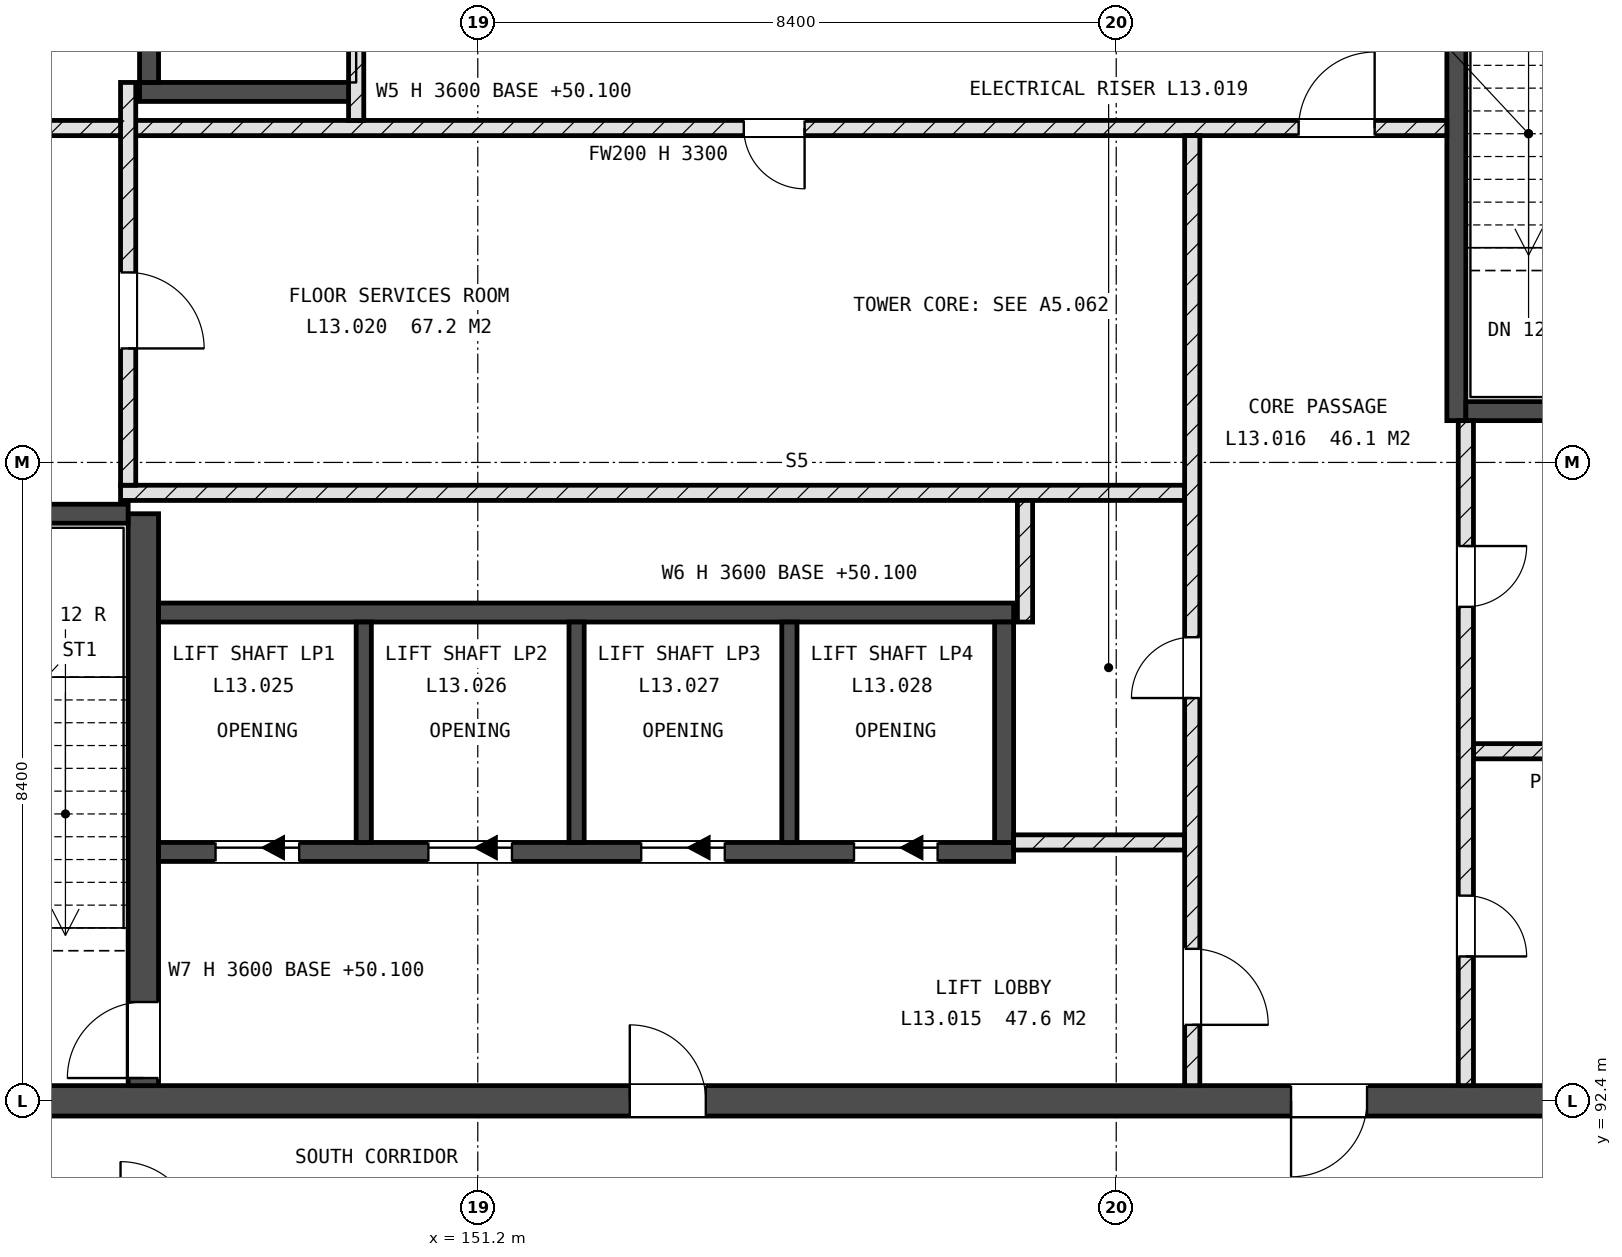
"""IFC4 building model, lengths in metres.
Left out: names, types, materials, properties, quantities, classifications, styles, units other than length and angle.
Written with IfcOpenShell. Run it as: python <this file> out.ifc"""

import sys

from ifc_helpers import new_model, si_unit, direction, frame, frame_2d, origin, place, context, subcontext, project, spatial, rectangle, extrude, element, fill, save


model = new_model("IFC4")
c1 = context("Model", 3, precision=1e-05, world=origin(), true_north=direction((0.0, 1.0)))
c2 = subcontext(c1, "Body", "Model", "MODEL_VIEW")
j1 = project(units=[si_unit("LENGTHUNIT", "METRE"), si_unit("PLANEANGLEUNIT", "RADIAN")], contexts=[c1])
p1 = place(None, origin())
s1 = spatial("IfcSite", under=j1, at=p1, CompositionType="ELEMENT")
p2 = place(p1, origin())
s2 = spatial("IfcBuilding", under=s1, at=p2, CompositionType="ELEMENT")
p3 = place(p2, frame((0.0, 0.0, 50.4)))
s3 = spatial("IfcBuildingStorey", under=s2, at=p3, CompositionType="ELEMENT", Elevation=50.4)
p4 = place(p3, frame((142.8, 92.4, -0.3), z_axis=(0.0, 0.0, 1.0), x_axis=(1.0, 0.0, 0.0)))
e1 = element("IfcWall", 1, at=p4, inside=s3, PredefinedType="SHEAR", context=c2, shape_type="SweptSolid", body=[
    extrude(rectangle(XDim=25.2, YDim=0.4, at=frame_2d((12.6, 0.0))), origin(), (0.0, 0.0, 1.0), 3.6),
])
p5 = place(p4, frame((1.4, 0.0, 0.3)))
e2 = element("IfcOpeningElement", 2, at=p5, cuts=e1, PredefinedType="OPENING", context=c2, shape_type="SweptSolid", body=[
    extrude(rectangle(XDim=1.0, YDim=2.1, at=frame_2d((0.5, 1.05))), frame((0.0, 0.21, 0.0), z_axis=(0.0, -1.0, 0.0), x_axis=(1.0, 0.0, 0.0)), (0.0, 0.0, 1.0), 0.42),
])
p6 = place(p4, frame((19.1, 0.0, 0.3)))
e3 = element("IfcOpeningElement", 3, at=p6, cuts=e1, PredefinedType="OPENING", context=c2, shape_type="SweptSolid", body=[
    extrude(rectangle(XDim=1.0, YDim=2.1, at=frame_2d((0.5, 1.05))), frame((0.0, 0.21, 0.0), z_axis=(0.0, -1.0, 0.0), x_axis=(1.0, 0.0, 0.0)), (0.0, 0.0, 1.0), 0.42),
])
p7 = place(p4, frame((10.4, 0.0, 0.3)))
e4 = element("IfcOpeningElement", 4, at=p7, cuts=e1, PredefinedType="OPENING", context=c2, shape_type="SweptSolid", body=[
    extrude(rectangle(XDim=1.0, YDim=2.1, at=frame_2d((0.5, 1.05))), frame((0.0, 0.21, 0.0), z_axis=(0.0, -1.0, 0.0), x_axis=(1.0, 0.0, 0.0)), (0.0, 0.0, 1.0), 0.42),
])
p8 = place(p3, frame((146.8, 92.6, -0.3), z_axis=(0.0, 0.0, 1.0), x_axis=(0.0, 1.0, 0.0)))
e5 = element("IfcWall", 5, at=p8, inside=s3, PredefinedType="SHEAR", context=c2, shape_type="SweptSolid", body=[
    extrude(rectangle(XDim=7.525, YDim=0.4, at=frame_2d((3.762, 0.0))), origin(), (0.0, 0.0, 1.0), 3.6),
])
p9 = place(p8, frame((0.1, 0.0, 0.3)))
e6 = element("IfcOpeningElement", 6, at=p9, cuts=e5, PredefinedType="OPENING", context=c2, shape_type="SweptSolid", body=[
    extrude(rectangle(XDim=1.0, YDim=2.1, at=frame_2d((0.5, 1.05))), frame((0.0, 0.21, 0.0), z_axis=(0.0, -1.0, 0.0), x_axis=(1.0, 0.0, 0.0)), (0.0, 0.0, 1.0), 0.42),
])
p10 = place(p3, frame((143.2, 100.125, -0.3), z_axis=(0.0, 0.0, 1.0), x_axis=(1.0, 0.0, 0.0)))
e7 = element("IfcWall", 7, at=p10, inside=s3, PredefinedType="SHEAR", context=c2, shape_type="SweptSolid", body=[
    extrude(rectangle(XDim=3.4, YDim=0.25, at=frame_2d((1.7, 0.0))), origin(), (0.0, 0.0, 1.0), 3.6),
])
p11 = place(p3, frame((164.075, 101.35, -0.3), z_axis=(0.0, 0.0, 1.0), x_axis=(0.0, 1.0, 0.0)))
e8 = element("IfcWall", 8, at=p11, inside=s3, PredefinedType="SHEAR", context=c2, shape_type="SweptSolid", body=[
    extrude(rectangle(XDim=7.65, YDim=0.25, at=frame_2d((3.825, 0.0))), origin(), (0.0, 0.0, 1.0), 3.6),
])
p12 = place(p11, frame((6.55, 0.0, 0.3)))
e9 = element("IfcOpeningElement", 9, at=p12, cuts=e8, PredefinedType="OPENING", context=c2, shape_type="SweptSolid", body=[
    extrude(rectangle(XDim=1.0, YDim=2.1, at=frame_2d((0.5, 1.05))), frame((0.0, 0.135, 0.0), z_axis=(0.0, -1.0, 0.0), x_axis=(1.0, 0.0, 0.0)), (0.0, 0.0, 1.0), 0.27),
])
p13 = place(p3, frame((164.2, 101.475, -0.3), z_axis=(0.0, 0.0, 1.0), x_axis=(1.0, 0.0, 0.0)))
e10 = element("IfcWall", 10, at=p13, inside=s3, PredefinedType="SHEAR", context=c2, shape_type="SweptSolid", body=[
    extrude(rectangle(XDim=3.6, YDim=0.25, at=frame_2d((1.8, 0.0))), origin(), (0.0, 0.0, 1.0), 3.6),
])
p14 = place(p3, frame((147.0, 95.675, -0.3), z_axis=(0.0, 0.0, 1.0), x_axis=(1.0, 0.0, 0.0)))
e11 = element("IfcWall", 11, at=p14, inside=s3, PredefinedType="SHEAR", context=c2, shape_type="SweptSolid", body=[
    extrude(rectangle(XDim=11.25, YDim=0.25, at=frame_2d((5.625, 0.0))), origin(), (0.0, 0.0, 1.0), 3.6),
])
p15 = place(p14, frame((0.75, 0.0, 0.3)))
e12 = element("IfcOpeningElement", 12, at=p15, cuts=e11, PredefinedType="OPENING", context=c2, shape_type="SweptSolid", body=[
    extrude(rectangle(XDim=1.1, YDim=2.1, at=frame_2d((0.55, 1.05))), frame((0.0, 0.135, 0.0), z_axis=(0.0, -1.0, 0.0), x_axis=(1.0, 0.0, 0.0)), (0.0, 0.0, 1.0), 0.27),
])
p16 = place(p14, frame((3.55, 0.0, 0.3)))
e13 = element("IfcOpeningElement", 13, at=p16, cuts=e11, PredefinedType="OPENING", context=c2, shape_type="SweptSolid", body=[
    extrude(rectangle(XDim=1.1, YDim=2.1, at=frame_2d((0.55, 1.05))), frame((0.0, 0.135, 0.0), z_axis=(0.0, -1.0, 0.0), x_axis=(1.0, 0.0, 0.0)), (0.0, 0.0, 1.0), 0.27),
])
p17 = place(p14, frame((6.35, 0.0, 0.3)))
e14 = element("IfcOpeningElement", 14, at=p17, cuts=e11, PredefinedType="OPENING", context=c2, shape_type="SweptSolid", body=[
    extrude(rectangle(XDim=1.1, YDim=2.1, at=frame_2d((0.55, 1.05))), frame((0.0, 0.135, 0.0), z_axis=(0.0, -1.0, 0.0), x_axis=(1.0, 0.0, 0.0)), (0.0, 0.0, 1.0), 0.27),
])
p18 = place(p14, frame((9.15, 0.0, 0.3)))
e15 = element("IfcOpeningElement", 15, at=p18, cuts=e11, PredefinedType="OPENING", context=c2, shape_type="SweptSolid", body=[
    extrude(rectangle(XDim=1.1, YDim=2.1, at=frame_2d((0.55, 1.05))), frame((0.0, 0.135, 0.0), z_axis=(0.0, -1.0, 0.0), x_axis=(1.0, 0.0, 0.0)), (0.0, 0.0, 1.0), 0.27),
])
p19 = place(p3, frame((147.0, 98.825, -0.3), z_axis=(0.0, 0.0, 1.0), x_axis=(1.0, 0.0, 0.0)))
e16 = element("IfcWall", 16, at=p19, inside=s3, PredefinedType="SHEAR", context=c2, shape_type="SweptSolid", body=[
    extrude(rectangle(XDim=11.25, YDim=0.25, at=frame_2d((5.625, 0.0))), origin(), (0.0, 0.0, 1.0), 3.6),
])
p20 = place(p3, frame((158.125, 95.8, -0.3), z_axis=(0.0, 0.0, 1.0), x_axis=(0.0, 1.0, 0.0)))
e17 = element("IfcWall", 17, at=p20, inside=s3, PredefinedType="SHEAR", context=c2, shape_type="SweptSolid", body=[
    extrude(rectangle(XDim=2.9, YDim=0.25, at=frame_2d((1.45, 0.0))), origin(), (0.0, 0.0, 1.0), 3.6),
])
for number, where, z_axis, x_axis in (
    (18, (149.7, 95.8, -0.3), (0.0, 0.0, 1.0), (0.0, 1.0, 0.0)),
    (19, (152.5, 95.8, -0.3), (0.0, 0.0, 1.0), (0.0, 1.0, 0.0)),
    (20, (155.3, 95.8, -0.3), (0.0, 0.0, 1.0), (0.0, 1.0, 0.0)),
):
    element("IfcWall", number, at=place(p3, frame(where, z_axis=z_axis, x_axis=x_axis)), inside=s3, PredefinedType="SHEAR", context=c2, shape_type="SweptSolid", body=[
        extrude(rectangle(XDim=2.9, YDim=0.2, at=frame_2d((1.45, 0.0))), origin(), (0.0, 0.0, 1.0), 3.6),
    ])
p21 = place(p3, frame((146.75, 105.675, -0.3), z_axis=(0.0, 0.0, 1.0), x_axis=(1.0, 0.0, 0.0)))
e21 = element("IfcWall", 21, at=p21, inside=s3, PredefinedType="SHEAR", context=c2, shape_type="SweptSolid", body=[
    extrude(rectangle(XDim=2.85, YDim=0.25, at=frame_2d((1.425, 0.0))), origin(), (0.0, 0.0, 1.0), 3.6),
])
p22 = place(p3, frame((146.875, 105.8, -0.3), z_axis=(0.0, 0.0, 1.0), x_axis=(0.0, 1.0, 0.0)))
e22 = element("IfcWall", 22, at=p22, inside=s3, PredefinedType="SHEAR", context=c2, shape_type="SweptSolid", body=[
    extrude(rectangle(XDim=2.9, YDim=0.25, at=frame_2d((1.45, 0.0))), origin(), (0.0, 0.0, 1.0), 3.6),
])
p23 = place(p3, frame((158.25, 95.8, 0.0), z_axis=(0.0, 0.0, 1.0), x_axis=(1.0, 0.0, 0.0)))
e23 = element("IfcWall", 23, at=p23, inside=s3, PredefinedType="SOLIDWALL", context=c2, shape_type="SweptSolid", body=[
    extrude(rectangle(XDim=2.25, YDim=0.2, at=frame_2d((1.125, 0.0))), origin(), (0.0, 0.0, 1.0), 3.3),
])
p24 = place(p3, frame((164.3, 97.0, 0.0), z_axis=(0.0, 0.0, 1.0), x_axis=(1.0, 0.0, 0.0)))
e24 = element("IfcWall", 24, at=p24, inside=s3, PredefinedType="SOLIDWALL", context=c2, shape_type="SweptSolid", body=[
    extrude(rectangle(XDim=3.3, YDim=0.2, at=frame_2d((1.65, 0.0))), origin(), (0.0, 0.0, 1.0), 3.3),
])
p25 = place(p3, frame((146.5, 100.4, 0.0), z_axis=(0.0, 0.0, 1.0), x_axis=(1.0, 0.0, 0.0)))
e25 = element("IfcWall", 25, at=p25, inside=s3, PredefinedType="SOLIDWALL", context=c2, shape_type="SweptSolid", body=[
    extrude(rectangle(XDim=14.0, YDim=0.2, at=frame_2d((7.0, 0.0))), origin(), (0.0, 0.0, 1.0), 3.3),
])
p26 = place(p3, frame((143.2, 105.2, 0.0), z_axis=(0.0, 0.0, 1.0), x_axis=(1.0, 0.0, 0.0)))
e26 = element("IfcWall", 26, at=p26, inside=s3, PredefinedType="SOLIDWALL", context=c2, shape_type="SweptSolid", body=[
    extrude(rectangle(XDim=20.75, YDim=0.2, at=frame_2d((10.375, 0.0))), origin(), (0.0, 0.0, 1.0), 3.3),
])
p27 = place(p26, frame((11.5, 0.0, 0.0)))
e27 = element("IfcOpeningElement", 27, at=p27, cuts=e26, PredefinedType="OPENING", context=c2, shape_type="SweptSolid", body=[
    extrude(rectangle(XDim=0.8, YDim=2.1, at=frame_2d((0.4, 1.05))), frame((0.0, 0.11, 0.0), z_axis=(0.0, -1.0, 0.0), x_axis=(1.0, 0.0, 0.0)), (0.0, 0.0, 1.0), 0.22),
])
p28 = place(p26, frame((18.8, 0.0, 0.0)))
e28 = element("IfcOpeningElement", 28, at=p28, cuts=e26, PredefinedType="OPENING", context=c2, shape_type="SweptSolid", body=[
    extrude(rectangle(XDim=1.0, YDim=2.1, at=frame_2d((0.5, 1.05))), frame((0.0, 0.11, 0.0), z_axis=(0.0, -1.0, 0.0), x_axis=(1.0, 0.0, 0.0)), (0.0, 0.0, 1.0), 0.22),
])
p29 = place(p3, frame((146.6, 100.5, 0.0), z_axis=(0.0, 0.0, 1.0), x_axis=(0.0, 1.0, 0.0)))
e29 = element("IfcWall", 29, at=p29, inside=s3, PredefinedType="SOLIDWALL", context=c2, shape_type="SweptSolid", body=[
    extrude(rectangle(XDim=5.3, YDim=0.2, at=frame_2d((2.65, 0.0))), origin(), (0.0, 0.0, 1.0), 3.3),
])
p30 = place(p29, frame((1.8, 0.0, 0.0)))
e30 = element("IfcOpeningElement", 30, at=p30, cuts=e29, PredefinedType="OPENING", context=c2, shape_type="SweptSolid", body=[
    extrude(rectangle(XDim=1.0, YDim=2.1, at=frame_2d((0.5, 1.05))), frame((0.0, 0.11, 0.0), z_axis=(0.0, -1.0, 0.0), x_axis=(1.0, 0.0, 0.0)), (0.0, 0.0, 1.0), 0.22),
])
p31 = place(p3, frame((149.6, 105.3, 0.0), z_axis=(0.0, 0.0, 1.0), x_axis=(0.0, 1.0, 0.0)))
e31 = element("IfcWall", 31, at=p31, inside=s3, PredefinedType="SOLIDWALL", context=c2, shape_type="SweptSolid", body=[
    extrude(rectangle(XDim=3.7, YDim=0.2, at=frame_2d((1.85, 0.0))), origin(), (0.0, 0.0, 1.0), 3.3),
])
p32 = place(p31, frame((1.4, 0.0, 0.0)))
e32 = element("IfcOpeningElement", 32, at=p32, cuts=e31, PredefinedType="OPENING", context=c2, shape_type="SweptSolid", body=[
    extrude(rectangle(XDim=1.1, YDim=2.1, at=frame_2d((0.55, 1.05))), frame((0.0, 0.11, 0.0), z_axis=(0.0, -1.0, 0.0), x_axis=(1.0, 0.0, 0.0)), (0.0, 0.0, 1.0), 0.22),
])
p33 = place(p3, frame((158.4, 98.7, 0.0), z_axis=(0.0, 0.0, 1.0), x_axis=(0.0, 1.0, 0.0)))
e33 = element("IfcWall", 33, at=p33, inside=s3, PredefinedType="SOLIDWALL", context=c2, shape_type="SweptSolid", body=[
    extrude(rectangle(XDim=1.6, YDim=0.2, at=frame_2d((0.8, 0.0))), origin(), (0.0, 0.0, 1.0), 3.3),
])
p34 = place(p3, frame((160.6, 92.6, 0.0), z_axis=(0.0, 0.0, 1.0), x_axis=(0.0, 1.0, 0.0)))
e34 = element("IfcWall", 34, at=p34, inside=s3, PredefinedType="SOLIDWALL", context=c2, shape_type="SweptSolid", body=[
    extrude(rectangle(XDim=12.5, YDim=0.2, at=frame_2d((6.25, 0.0))), origin(), (0.0, 0.0, 1.0), 3.3),
])
p35 = place(p34, frame((5.1, 0.0, 0.0)))
e35 = element("IfcOpeningElement", 35, at=p35, cuts=e34, PredefinedType="OPENING", context=c2, shape_type="SweptSolid", body=[
    extrude(rectangle(XDim=0.8, YDim=2.1, at=frame_2d((0.4, 1.05))), frame((0.0, 0.11, 0.0), z_axis=(0.0, -1.0, 0.0), x_axis=(1.0, 0.0, 0.0)), (0.0, 0.0, 1.0), 0.22),
])
p36 = place(p34, frame((0.8, 0.0, 0.0)))
e36 = element("IfcOpeningElement", 36, at=p36, cuts=e34, PredefinedType="OPENING", context=c2, shape_type="SweptSolid", body=[
    extrude(rectangle(XDim=1.0, YDim=2.1, at=frame_2d((0.5, 1.05))), frame((0.0, 0.11, 0.0), z_axis=(0.0, -1.0, 0.0), x_axis=(1.0, 0.0, 0.0)), (0.0, 0.0, 1.0), 0.22),
])
p37 = place(p3, frame((164.2, 92.6, 0.0), z_axis=(0.0, 0.0, 1.0), x_axis=(0.0, 1.0, 0.0)))
e37 = element("IfcWall", 37, at=p37, inside=s3, PredefinedType="SOLIDWALL", context=c2, shape_type="SweptSolid", body=[
    extrude(rectangle(XDim=8.75, YDim=0.2, at=frame_2d((4.375, 0.0))), origin(), (0.0, 0.0, 1.0), 3.3),
])
p38 = place(p37, frame((1.7, 0.0, 0.0)))
e38 = element("IfcOpeningElement", 38, at=p38, cuts=e37, PredefinedType="OPENING", context=c2, shape_type="SweptSolid", body=[
    extrude(rectangle(XDim=0.8, YDim=2.1, at=frame_2d((0.4, 1.05))), frame((0.0, 0.11, 0.0), z_axis=(0.0, -1.0, 0.0), x_axis=(1.0, 0.0, 0.0)), (0.0, 0.0, 1.0), 0.22),
])
p39 = place(p37, frame((6.3, 0.0, 0.0)))
e39 = element("IfcOpeningElement", 39, at=p39, cuts=e37, PredefinedType="OPENING", context=c2, shape_type="SweptSolid", body=[
    extrude(rectangle(XDim=0.8, YDim=2.1, at=frame_2d((0.4, 1.05))), frame((0.0, 0.11, 0.0), z_axis=(0.0, -1.0, 0.0), x_axis=(1.0, 0.0, 0.0)), (0.0, 0.0, 1.0), 0.22),
])
p40 = place(p15, origin())
e40 = element("IfcDoor", 40, at=p40, inside=s3, OperationType="SLIDING_TO_LEFT", PredefinedType="DOOR", context=c2, shape_type="SweptSolid", body=[
    extrude(rectangle(XDim=1.1, YDim=2.1, at=frame_2d((0.55, 1.05))), frame((0.0, 0.025, 0.0), z_axis=(0.0, -1.0, 0.0), x_axis=(1.0, 0.0, 0.0)), (0.0, 0.0, 1.0), 0.05),
])
fill(e12, e40)
p41 = place(p16, origin())
e41 = element("IfcDoor", 41, at=p41, inside=s3, OperationType="SLIDING_TO_LEFT", PredefinedType="DOOR", context=c2, shape_type="SweptSolid", body=[
    extrude(rectangle(XDim=1.1, YDim=2.1, at=frame_2d((0.55, 1.05))), frame((0.0, 0.025, 0.0), z_axis=(0.0, -1.0, 0.0), x_axis=(1.0, 0.0, 0.0)), (0.0, 0.0, 1.0), 0.05),
])
fill(e13, e41)
p42 = place(p17, origin())
e42 = element("IfcDoor", 42, at=p42, inside=s3, OperationType="SLIDING_TO_LEFT", PredefinedType="DOOR", context=c2, shape_type="SweptSolid", body=[
    extrude(rectangle(XDim=1.1, YDim=2.1, at=frame_2d((0.55, 1.05))), frame((0.0, 0.025, 0.0), z_axis=(0.0, -1.0, 0.0), x_axis=(1.0, 0.0, 0.0)), (0.0, 0.0, 1.0), 0.05),
])
fill(e14, e42)
p43 = place(p18, origin())
e43 = element("IfcDoor", 43, at=p43, inside=s3, OperationType="SLIDING_TO_LEFT", PredefinedType="DOOR", context=c2, shape_type="SweptSolid", body=[
    extrude(rectangle(XDim=1.1, YDim=2.1, at=frame_2d((0.55, 1.05))), frame((0.0, 0.025, 0.0), z_axis=(0.0, -1.0, 0.0), x_axis=(1.0, 0.0, 0.0)), (0.0, 0.0, 1.0), 0.05),
])
fill(e15, e43)
p44 = place(p9, origin())
e44 = element("IfcDoor", 44, at=p44, inside=s3, OperationType="SINGLE_SWING_RIGHT", PredefinedType="DOOR", context=c2, shape_type="SweptSolid", body=[
    extrude(rectangle(XDim=1.0, YDim=2.1, at=frame_2d((0.5, 1.05))), frame((0.0, 0.025, 0.0), z_axis=(0.0, -1.0, 0.0), x_axis=(1.0, 0.0, 0.0)), (0.0, 0.0, 1.0), 0.05),
])
fill(e6, e44)
p45 = place(p38, origin())
e45 = element("IfcDoor", 45, at=p45, inside=s3, OperationType="SINGLE_SWING_LEFT", PredefinedType="DOOR", context=c2, shape_type="SweptSolid", body=[
    extrude(rectangle(XDim=0.8, YDim=2.1, at=frame_2d((0.4, 1.05))), frame((0.0, 0.025, 0.0), z_axis=(0.0, -1.0, 0.0), x_axis=(1.0, 0.0, 0.0)), (0.0, 0.0, 1.0), 0.05),
])
fill(e38, e45)
p46 = place(p39, origin())
e46 = element("IfcDoor", 46, at=p46, inside=s3, OperationType="SINGLE_SWING_RIGHT", PredefinedType="DOOR", context=c2, shape_type="SweptSolid", body=[
    extrude(rectangle(XDim=0.8, YDim=2.1, at=frame_2d((0.4, 1.05))), frame((0.0, 0.025, 0.0), z_axis=(0.0, -1.0, 0.0), x_axis=(1.0, 0.0, 0.0)), (0.0, 0.0, 1.0), 0.05),
])
fill(e39, e46)
p47 = place(p35, origin())
e47 = element("IfcDoor", 47, at=p47, inside=s3, OperationType="SINGLE_SWING_RIGHT", PredefinedType="DOOR", context=c2, shape_type="SweptSolid", body=[
    extrude(rectangle(XDim=0.8, YDim=2.1, at=frame_2d((0.4, 1.05))), frame((0.0, 0.025, 0.0), z_axis=(0.0, -1.0, 0.0), x_axis=(1.0, 0.0, 0.0)), (0.0, 0.0, 1.0), 0.05),
])
fill(e35, e47)
p48 = place(p27, origin())
e48 = element("IfcDoor", 48, at=p48, inside=s3, OperationType="SINGLE_SWING_RIGHT", PredefinedType="DOOR", context=c2, shape_type="SweptSolid", body=[
    extrude(rectangle(XDim=0.8, YDim=2.1, at=frame_2d((0.4, 1.05))), frame((0.0, 0.025, 0.0), z_axis=(0.0, -1.0, 0.0), x_axis=(1.0, 0.0, 0.0)), (0.0, 0.0, 1.0), 0.05),
])
fill(e27, e48)
p49 = place(p30, origin())
e49 = element("IfcDoor", 49, at=p49, inside=s3, OperationType="SINGLE_SWING_LEFT", PredefinedType="DOOR", context=c2, shape_type="SweptSolid", body=[
    extrude(rectangle(XDim=1.0, YDim=2.1, at=frame_2d((0.5, 1.05))), frame((0.0, 0.025, 0.0), z_axis=(0.0, -1.0, 0.0), x_axis=(1.0, 0.0, 0.0)), (0.0, 0.0, 1.0), 0.05),
])
fill(e30, e49)
p50 = place(p6, origin())
e50 = element("IfcDoor", 50, at=p50, inside=s3, OperationType="SINGLE_SWING_LEFT", PredefinedType="DOOR", context=c2, shape_type="SweptSolid", body=[
    extrude(rectangle(XDim=1.0, YDim=2.1, at=frame_2d((0.5, 1.05))), frame((0.0, 0.025, 0.0), z_axis=(0.0, -1.0, 0.0), x_axis=(1.0, 0.0, 0.0)), (0.0, 0.0, 1.0), 0.05),
])
fill(e3, e50)
p51 = place(p7, origin())
e51 = element("IfcDoor", 51, at=p51, inside=s3, OperationType="SINGLE_SWING_RIGHT", PredefinedType="DOOR", context=c2, shape_type="SweptSolid", body=[
    extrude(rectangle(XDim=1.0, YDim=2.1, at=frame_2d((0.5, 1.05))), frame((0.0, 0.025, 0.0), z_axis=(0.0, -1.0, 0.0), x_axis=(1.0, 0.0, 0.0)), (0.0, 0.0, 1.0), 0.05),
])
fill(e4, e51)
p52 = place(p36, origin())
e52 = element("IfcDoor", 52, at=p52, inside=s3, OperationType="SINGLE_SWING_LEFT", PredefinedType="DOOR", context=c2, shape_type="SweptSolid", body=[
    extrude(rectangle(XDim=1.0, YDim=2.1, at=frame_2d((0.5, 1.05))), frame((0.0, 0.025, 0.0), z_axis=(0.0, -1.0, 0.0), x_axis=(1.0, 0.0, 0.0)), (0.0, 0.0, 1.0), 0.05),
])
fill(e36, e52)
p53 = place(p28, origin())
e53 = element("IfcDoor", 53, at=p53, inside=s3, OperationType="SINGLE_SWING_LEFT", PredefinedType="DOOR", context=c2, shape_type="SweptSolid", body=[
    extrude(rectangle(XDim=1.0, YDim=2.1, at=frame_2d((0.5, 1.05))), frame((0.0, 0.025, 0.0), z_axis=(0.0, -1.0, 0.0), x_axis=(1.0, 0.0, 0.0)), (0.0, 0.0, 1.0), 0.05),
])
fill(e28, e53)
save(model, sys.argv[1])
